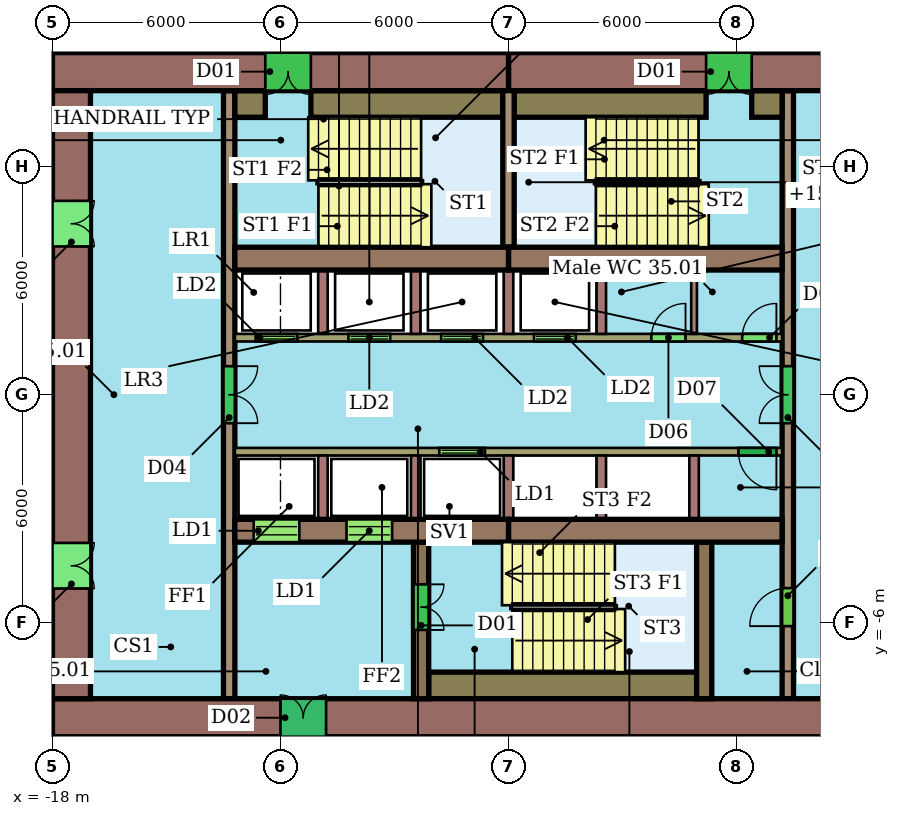
"""IFC4 building model, lengths in metres.
Left out: names, types, materials, properties, quantities, classifications, styles, units other than length and angle.
Written with IfcOpenShell. Run it as: python <this file> out.ifc"""

import sys

from ifc_helpers import new_model, si_unit, direction, frame, frame_2d, origin, place, context, subcontext, project, spatial, rectangle, extrude, element, fill, save


model = new_model("IFC4")
c1 = context("Model", 3, precision=1e-05, world=origin(), true_north=direction((0.0, 1.0)))
c2 = subcontext(c1, "Body", "Model", "MODEL_VIEW")
j1 = project(units=[si_unit("LENGTHUNIT", "METRE"), si_unit("PLANEANGLEUNIT", "RADIAN")], contexts=[c1])
p1 = place(None, origin())
s1 = spatial("IfcSite", under=j1, at=p1, CompositionType="ELEMENT")
p2 = place(p1, origin())
s2 = spatial("IfcBuilding", under=s1, at=p2, CompositionType="ELEMENT")
p3 = place(p2, frame((0.0, 0.0, 150.6)))
s3 = spatial("IfcBuildingStorey", under=s2, at=p3, CompositionType="ELEMENT", Elevation=150.6)
p4 = place(p3, frame((6.0, 8.5, 0.0), z_axis=(0.0, 0.0, 1.0), x_axis=(-1.0, 0.0, 0.0)))
e1 = element("IfcWall", 1, at=p4, inside=s3, PredefinedType="SHEAR", context=c2, shape_type="SweptSolid", body=[
    extrude(rectangle(XDim=12.0, YDim=1.0, at=frame_2d((6.0, 0.0))), origin(), (0.0, 0.0, 1.0), 3.3),
])
p5 = place(p4, frame((5.6, 0.0, 0.0)))
e2 = element("IfcOpeningElement", 2, at=p5, cuts=e1, PredefinedType="OPENING", context=c2, shape_type="SweptSolid", body=[
    extrude(rectangle(XDim=1.2, YDim=2.1, at=frame_2d((0.6, 1.05))), frame((0.0, 0.51, 0.0), z_axis=(0.0, -1.0, 0.0), x_axis=(1.0, 0.0, 0.0)), (0.0, 0.0, 1.0), 1.02),
])
p6 = place(p3, frame((-6.0, 8.5, 0.0), z_axis=(0.0, 0.0, 1.0), x_axis=(-1.0, 0.0, 0.0)))
e3 = element("IfcWall", 3, at=p6, inside=s3, PredefinedType="SHEAR", context=c2, shape_type="SweptSolid", body=[
    extrude(rectangle(XDim=12.0, YDim=1.0, at=frame_2d((6.0, 0.0))), origin(), (0.0, 0.0, 1.0), 3.3),
])
p7 = place(p6, frame((5.2, 0.0, 0.0)))
e4 = element("IfcOpeningElement", 4, at=p7, cuts=e3, PredefinedType="OPENING", context=c2, shape_type="SweptSolid", body=[
    extrude(rectangle(XDim=1.2, YDim=2.1, at=frame_2d((0.6, 1.05))), frame((0.0, 0.51, 0.0), z_axis=(0.0, -1.0, 0.0), x_axis=(1.0, 0.0, 0.0)), (0.0, 0.0, 1.0), 1.02),
])
p8 = place(p3, frame((-18.0, -8.5, 0.0), z_axis=(0.0, 0.0, 1.0), x_axis=(1.0, 0.0, 0.0)))
e5 = element("IfcWall", 5, at=p8, inside=s3, PredefinedType="SHEAR", context=c2, shape_type="SweptSolid", body=[
    extrude(rectangle(XDim=24.0, YDim=1.0, at=frame_2d((12.0, 0.0))), origin(), (0.0, 0.0, 1.0), 3.3),
])
p9 = place(p8, frame((6.0, 0.0, 0.0)))
e6 = element("IfcOpeningElement", 6, at=p9, cuts=e5, PredefinedType="OPENING", context=c2, shape_type="SweptSolid", body=[
    extrude(rectangle(XDim=1.2, YDim=2.1, at=frame_2d((0.6, 1.05))), frame((0.0, 0.51, 0.0), z_axis=(0.0, -1.0, 0.0), x_axis=(1.0, 0.0, 0.0)), (0.0, 0.0, 1.0), 1.02),
])
p10 = place(p3, frame((-17.5, 8.0, 0.0), z_axis=(0.0, 0.0, 1.0), x_axis=(0.0, -1.0, 0.0)))
e7 = element("IfcWall", 7, at=p10, inside=s3, PredefinedType="SHEAR", context=c2, shape_type="SweptSolid", body=[
    extrude(rectangle(XDim=16.0, YDim=1.0, at=frame_2d((8.0, 0.0))), origin(), (0.0, 0.0, 1.0), 3.3),
])
p11 = place(p10, frame((11.9, 0.0, 0.0)))
e8 = element("IfcOpeningElement", 8, at=p11, cuts=e7, PredefinedType="OPENING", context=c2, shape_type="SweptSolid", body=[
    extrude(rectangle(XDim=1.2, YDim=2.1, at=frame_2d((0.6, 1.05))), frame((0.0, 0.51, 0.0), z_axis=(0.0, -1.0, 0.0), x_axis=(1.0, 0.0, 0.0)), (0.0, 0.0, 1.0), 1.02),
])
p12 = place(p10, frame((2.9, 0.0, 0.0)))
e9 = element("IfcOpeningElement", 9, at=p12, cuts=e7, PredefinedType="OPENING", context=c2, shape_type="SweptSolid", body=[
    extrude(rectangle(XDim=1.2, YDim=2.1, at=frame_2d((0.6, 1.05))), frame((0.0, 0.51, 0.0), z_axis=(0.0, -1.0, 0.0), x_axis=(1.0, 0.0, 0.0)), (0.0, 0.0, 1.0), 1.02),
])
for number, where, z_axis, x_axis in (
    (10, (-13.2, 3.58, 0.0), (0.0, 0.0, 1.0), (1.0, 0.0, 0.0)),
    (11, (-6.0, 3.58, 0.0), (0.0, 0.0, 1.0), (1.0, 0.0, 0.0)),
):
    element("IfcWall", number, at=place(p3, frame(where, z_axis=z_axis, x_axis=x_axis)), inside=s3, PredefinedType="SHEAR", context=c2, shape_type="SweptSolid", body=[
        extrude(rectangle(XDim=7.2, YDim=0.6, at=frame_2d((3.6, 0.0))), origin(), (0.0, 0.0, 1.0), 3.3),
    ])
p13 = place(p3, frame((-13.2, -3.58, 0.0), z_axis=(0.0, 0.0, 1.0), x_axis=(1.0, 0.0, 0.0)))
e12 = element("IfcWall", 12, at=p13, inside=s3, PredefinedType="SHEAR", context=c2, shape_type="SweptSolid", body=[
    extrude(rectangle(XDim=7.2, YDim=0.6, at=frame_2d((3.6, 0.0))), origin(), (0.0, 0.0, 1.0), 3.3),
])
p14 = place(p13, frame((0.496, 0.0, 0.0)))
e13 = element("IfcOpeningElement", 13, at=p14, cuts=e12, PredefinedType="OPENING", context=c2, shape_type="SweptSolid", body=[
    extrude(rectangle(XDim=1.2, YDim=2.1, at=frame_2d((0.6, 1.05))), frame((0.0, 0.31, 0.0), z_axis=(0.0, -1.0, 0.0), x_axis=(1.0, 0.0, 0.0)), (0.0, 0.0, 1.0), 0.62),
])
p15 = place(p13, frame((2.938, 0.0, 0.0)))
e14 = element("IfcOpeningElement", 14, at=p15, cuts=e12, PredefinedType="OPENING", context=c2, shape_type="SweptSolid", body=[
    extrude(rectangle(XDim=1.2, YDim=2.1, at=frame_2d((0.6, 1.05))), frame((0.0, 0.31, 0.0), z_axis=(0.0, -1.0, 0.0), x_axis=(1.0, 0.0, 0.0)), (0.0, 0.0, 1.0), 0.62),
])
p16 = place(p3, frame((-6.0, -3.58, 0.0), z_axis=(0.0, 0.0, 1.0), x_axis=(1.0, 0.0, 0.0)))
e15 = element("IfcWall", 15, at=p16, inside=s3, PredefinedType="SHEAR", context=c2, shape_type="SweptSolid", body=[
    extrude(rectangle(XDim=7.2, YDim=0.6, at=frame_2d((3.6, 0.0))), origin(), (0.0, 0.0, 1.0), 3.3),
])
p17 = place(p3, frame((-13.35, 8.0, 0.0), z_axis=(0.0, 0.0, 1.0), x_axis=(0.0, -1.0, 0.0)))
e16 = element("IfcWall", 16, at=p17, inside=s3, PredefinedType="SHEAR", context=c2, shape_type="SweptSolid", body=[
    extrude(rectangle(XDim=16.0, YDim=0.3, at=frame_2d((8.0, 0.0))), origin(), (0.0, 0.0, 1.0), 3.3),
])
p18 = place(p17, frame((7.25, 0.0, 0.0)))
e17 = element("IfcOpeningElement", 17, at=p18, cuts=e16, PredefinedType="OPENING", context=c2, shape_type="SweptSolid", body=[
    extrude(rectangle(XDim=1.5, YDim=2.1, at=frame_2d((0.75, 1.05))), frame((0.0, 0.16, 0.0), z_axis=(0.0, -1.0, 0.0), x_axis=(1.0, 0.0, 0.0)), (0.0, 0.0, 1.0), 0.32),
])
p19 = place(p3, frame((1.35, -8.0, 0.0), z_axis=(0.0, 0.0, 1.0), x_axis=(0.0, 1.0, 0.0)))
e18 = element("IfcWall", 18, at=p19, inside=s3, PredefinedType="SHEAR", context=c2, shape_type="SweptSolid", body=[
    extrude(rectangle(XDim=16.0, YDim=0.3, at=frame_2d((8.0, 0.0))), origin(), (0.0, 0.0, 1.0), 3.3),
])
p20 = place(p19, frame((1.91, 0.0, 0.0)))
e19 = element("IfcOpeningElement", 19, at=p20, cuts=e18, PredefinedType="OPENING", context=c2, shape_type="SweptSolid", body=[
    extrude(rectangle(XDim=1.0, YDim=2.1, at=frame_2d((0.5, 1.05))), frame((0.0, 0.16, 0.0), z_axis=(0.0, -1.0, 0.0), x_axis=(1.0, 0.0, 0.0)), (0.0, 0.0, 1.0), 0.32),
])
p21 = place(p19, frame((7.25, 0.0, 0.0)))
e20 = element("IfcOpeningElement", 20, at=p21, cuts=e18, PredefinedType="OPENING", context=c2, shape_type="SweptSolid", body=[
    extrude(rectangle(XDim=1.5, YDim=2.1, at=frame_2d((0.75, 1.05))), frame((0.0, 0.16, 0.0), z_axis=(0.0, -1.0, 0.0), x_axis=(1.0, 0.0, 0.0)), (0.0, 0.0, 1.0), 0.32),
])
p22 = place(p3, frame((-13.2, 1.5, 0.0), z_axis=(0.0, 0.0, 1.0), x_axis=(1.0, 0.0, 0.0)))
e21 = element("IfcWall", 21, at=p22, inside=s3, PredefinedType="SHEAR", context=c2, shape_type="SweptSolid", body=[
    extrude(rectangle(XDim=14.4, YDim=0.2, at=frame_2d((7.2, 0.0))), origin(), (0.0, 0.0, 1.0), 3.3),
])
p23 = place(p22, frame((0.546, 0.0, 0.0)))
e22 = element("IfcOpeningElement", 22, at=p23, cuts=e21, PredefinedType="OPENING", context=c2, shape_type="SweptSolid", body=[
    extrude(rectangle(XDim=1.1, YDim=2.1, at=frame_2d((0.55, 1.05))), frame((0.0, 0.11, 0.0), z_axis=(0.0, -1.0, 0.0), x_axis=(1.0, 0.0, 0.0)), (0.0, 0.0, 1.0), 0.22),
])
p24 = place(p22, frame((2.988, 0.0, 0.0)))
e23 = element("IfcOpeningElement", 23, at=p24, cuts=e21, PredefinedType="OPENING", context=c2, shape_type="SweptSolid", body=[
    extrude(rectangle(XDim=1.1, YDim=2.1, at=frame_2d((0.55, 1.05))), frame((0.0, 0.11, 0.0), z_axis=(0.0, -1.0, 0.0), x_axis=(1.0, 0.0, 0.0)), (0.0, 0.0, 1.0), 0.22),
])
p25 = place(p22, frame((5.429, 0.0, 0.0)))
e24 = element("IfcOpeningElement", 24, at=p25, cuts=e21, PredefinedType="OPENING", context=c2, shape_type="SweptSolid", body=[
    extrude(rectangle(XDim=1.1, YDim=2.1, at=frame_2d((0.55, 1.05))), frame((0.0, 0.11, 0.0), z_axis=(0.0, -1.0, 0.0), x_axis=(1.0, 0.0, 0.0)), (0.0, 0.0, 1.0), 0.22),
])
p26 = place(p22, frame((7.871, 0.0, 0.0)))
e25 = element("IfcOpeningElement", 25, at=p26, cuts=e21, PredefinedType="OPENING", context=c2, shape_type="SweptSolid", body=[
    extrude(rectangle(XDim=1.1, YDim=2.1, at=frame_2d((0.55, 1.05))), frame((0.0, 0.11, 0.0), z_axis=(0.0, -1.0, 0.0), x_axis=(1.0, 0.0, 0.0)), (0.0, 0.0, 1.0), 0.22),
])
p27 = place(p22, frame((10.958, 0.0, 0.0)))
e26 = element("IfcOpeningElement", 26, at=p27, cuts=e21, PredefinedType="OPENING", context=c2, shape_type="SweptSolid", body=[
    extrude(rectangle(XDim=0.9, YDim=2.1, at=frame_2d((0.45, 1.05))), frame((0.0, 0.11, 0.0), z_axis=(0.0, -1.0, 0.0), x_axis=(1.0, 0.0, 0.0)), (0.0, 0.0, 1.0), 0.22),
])
p28 = place(p22, frame((13.35, 0.0, 0.0)))
e27 = element("IfcOpeningElement", 27, at=p28, cuts=e21, PredefinedType="OPENING", context=c2, shape_type="SweptSolid", body=[
    extrude(rectangle(XDim=0.9, YDim=2.1, at=frame_2d((0.45, 1.05))), frame((0.0, 0.11, 0.0), z_axis=(0.0, -1.0, 0.0), x_axis=(1.0, 0.0, 0.0)), (0.0, 0.0, 1.0), 0.22),
])
p29 = place(p3, frame((1.2, -1.5, 0.0), z_axis=(0.0, 0.0, 1.0), x_axis=(-1.0, 0.0, 0.0)))
e28 = element("IfcWall", 28, at=p29, inside=s3, PredefinedType="SHEAR", context=c2, shape_type="SweptSolid", body=[
    extrude(rectangle(XDim=14.4, YDim=0.2, at=frame_2d((7.2, 0.0))), origin(), (0.0, 0.0, 1.0), 3.3),
])
p30 = place(p29, frame((7.821, 0.0, 0.0)))
e29 = element("IfcOpeningElement", 29, at=p30, cuts=e28, PredefinedType="OPENING", context=c2, shape_type="SweptSolid", body=[
    extrude(rectangle(XDim=1.2, YDim=2.1, at=frame_2d((0.6, 1.05))), frame((0.0, 0.11, 0.0), z_axis=(0.0, -1.0, 0.0), x_axis=(1.0, 0.0, 0.0)), (0.0, 0.0, 1.0), 0.22),
])
p31 = place(p29, frame((0.15, 0.0, 0.0)))
e30 = element("IfcOpeningElement", 30, at=p31, cuts=e28, PredefinedType="OPENING", context=c2, shape_type="SweptSolid", body=[
    extrude(rectangle(XDim=1.0, YDim=2.1, at=frame_2d((0.5, 1.05))), frame((0.0, 0.11, 0.0), z_axis=(0.0, -1.0, 0.0), x_axis=(1.0, 0.0, 0.0)), (0.0, 0.0, 1.0), 0.22),
])
p32 = place(p3, frame((-8.3, -3.88, 0.0), z_axis=(0.0, 0.0, 1.0), x_axis=(0.0, -1.0, 0.0)))
e31 = element("IfcWall", 31, at=p32, inside=s3, PredefinedType="SHEAR", context=c2, shape_type="SweptSolid", body=[
    extrude(rectangle(XDim=4.12, YDim=0.4, at=frame_2d((2.06, 0.0))), origin(), (0.0, 0.0, 1.0), 3.3),
])
p33 = place(p32, frame((1.11, 0.0, 0.0)))
e32 = element("IfcOpeningElement", 32, at=p33, cuts=e31, PredefinedType="OPENING", context=c2, shape_type="SweptSolid", body=[
    extrude(rectangle(XDim=1.2, YDim=2.1, at=frame_2d((0.6, 1.05))), frame((0.0, 0.21, 0.0), z_axis=(0.0, -1.0, 0.0), x_axis=(1.0, 0.0, 0.0)), (0.0, 0.0, 1.0), 0.42),
])
p34 = place(p3, frame((-0.85, -3.88, 0.0), z_axis=(0.0, 0.0, 1.0), x_axis=(0.0, -1.0, 0.0)))
e33 = element("IfcWall", 33, at=p34, inside=s3, PredefinedType="SHEAR", context=c2, shape_type="SweptSolid", body=[
    extrude(rectangle(XDim=4.12, YDim=0.4, at=frame_2d((2.06, 0.0))), origin(), (0.0, 0.0, 1.0), 3.3),
])
p35 = place(p3, frame((-6.0, 3.88, 0.0), z_axis=(0.0, 0.0, 1.0), x_axis=(0.0, 1.0, 0.0)))
e34 = element("IfcWall", 34, at=p35, inside=s3, PredefinedType="SHEAR", context=c2, shape_type="SweptSolid", body=[
    extrude(rectangle(XDim=4.12, YDim=0.3, at=frame_2d((2.06, 0.0))), origin(), (0.0, 0.0, 1.0), 3.3),
])
p36 = place(p3, frame((-13.2, 7.65, 0.0), z_axis=(0.0, 0.0, 1.0), x_axis=(1.0, 0.0, 0.0)))
e35 = element("IfcWall", 35, at=p36, inside=s3, PredefinedType="SHEAR", context=c2, shape_type="SweptSolid", body=[
    extrude(rectangle(XDim=0.8, YDim=0.7, at=frame_2d((0.4, 0.0))), origin(), (0.0, 0.0, 1.0), 3.3),
])
for number, where, z_axis, x_axis in (
    (36, (-11.2, 7.65, 0.0), (0.0, 0.0, 1.0), (1.0, 0.0, 0.0)),
    (37, (-5.85, 7.65, 0.0), (0.0, 0.0, 1.0), (1.0, 0.0, 0.0)),
):
    element("IfcWall", number, at=place(p3, frame(where, z_axis=z_axis, x_axis=x_axis)), inside=s3, PredefinedType="SHEAR", context=c2, shape_type="SweptSolid", body=[
        extrude(rectangle(XDim=5.05, YDim=0.7, at=frame_2d((2.525, 0.0))), origin(), (0.0, 0.0, 1.0), 3.3),
    ])
p37 = place(p3, frame((0.4, 7.65, 0.0), z_axis=(0.0, 0.0, 1.0), x_axis=(1.0, 0.0, 0.0)))
e38 = element("IfcWall", 38, at=p37, inside=s3, PredefinedType="SHEAR", context=c2, shape_type="SweptSolid", body=[
    extrude(rectangle(XDim=0.8, YDim=0.7, at=frame_2d((0.4, 0.0))), origin(), (0.0, 0.0, 1.0), 3.3),
])
p38 = place(p3, frame((-8.1, -7.65, 0.0), z_axis=(0.0, 0.0, 1.0), x_axis=(1.0, 0.0, 0.0)))
e39 = element("IfcWall", 39, at=p38, inside=s3, PredefinedType="SHEAR", context=c2, shape_type="SweptSolid", body=[
    extrude(rectangle(XDim=7.05, YDim=0.7, at=frame_2d((3.525, 0.0))), origin(), (0.0, 0.0, 1.0), 3.3),
])
for number, where, z_axis, x_axis in (
    (40, (-10.883, 1.6, 0.0), (0.0, 0.0, 1.0), (0.0, 1.0, 0.0)),
    (41, (-8.442, 1.6, 0.0), (0.0, 0.0, 1.0), (0.0, 1.0, 0.0)),
    (42, (-6.0, 1.6, 0.0), (0.0, 0.0, 1.0), (0.0, 1.0, 0.0)),
    (43, (-3.558, 1.6, 0.0), (0.0, 0.0, 1.0), (0.0, 1.0, 0.0)),
):
    element("IfcWall", number, at=place(p3, frame(where, z_axis=z_axis, x_axis=x_axis)), inside=s3, PredefinedType="SHEAR", context=c2, shape_type="SweptSolid", body=[
        extrude(rectangle(XDim=1.68, YDim=0.25, at=frame_2d((0.84, 0.0))), origin(), (0.0, 0.0, 1.0), 3.3),
    ])
p39 = place(p3, frame((-1.117, 1.6, 0.0), z_axis=(0.0, 0.0, 1.0), x_axis=(0.0, 1.0, 0.0)))
e44 = element("IfcWall", 44, at=p39, inside=s3, PredefinedType="PARTITIONING", context=c2, shape_type="SweptSolid", body=[
    extrude(rectangle(XDim=1.68, YDim=0.15, at=frame_2d((0.84, 0.0))), origin(), (0.0, 0.0, 1.0), 3.3),
])
for number, where, z_axis, x_axis in (
    (45, (-10.883, -1.6, 0.0), (0.0, 0.0, 1.0), (0.0, -1.0, 0.0)),
    (46, (-8.442, -1.6, 0.0), (0.0, 0.0, 1.0), (0.0, -1.0, 0.0)),
    (47, (-6.0, -1.6, 0.0), (0.0, 0.0, 1.0), (0.0, -1.0, 0.0)),
    (48, (-3.558, -1.6, 0.0), (0.0, 0.0, 1.0), (0.0, -1.0, 0.0)),
    (49, (-1.117, -1.6, 0.0), (0.0, 0.0, 1.0), (0.0, -1.0, 0.0)),
):
    element("IfcWall", number, at=place(p3, frame(where, z_axis=z_axis, x_axis=x_axis)), inside=s3, PredefinedType="SHEAR", context=c2, shape_type="SweptSolid", body=[
        extrude(rectangle(XDim=1.68, YDim=0.25, at=frame_2d((0.84, 0.0))), origin(), (0.0, 0.0, 1.0), 3.3),
    ])
p40 = place(p5, origin())
e50 = element("IfcDoor", 50, at=p40, inside=s3, OperationType="DOUBLE_DOOR_SINGLE_SWING", PredefinedType="NOTDEFINED", context=c2, shape_type="SweptSolid", body=[
    extrude(rectangle(XDim=1.2, YDim=2.1, at=frame_2d((0.6, 1.05))), frame((0.0, 0.025, 0.0), z_axis=(0.0, -1.0, 0.0), x_axis=(1.0, 0.0, 0.0)), (0.0, 0.0, 1.0), 0.05),
])
fill(e2, e50)
p41 = place(p7, origin())
e51 = element("IfcDoor", 51, at=p41, inside=s3, OperationType="DOUBLE_DOOR_SINGLE_SWING", PredefinedType="NOTDEFINED", context=c2, shape_type="SweptSolid", body=[
    extrude(rectangle(XDim=1.2, YDim=2.1, at=frame_2d((0.6, 1.05))), frame((0.0, 0.025, 0.0), z_axis=(0.0, -1.0, 0.0), x_axis=(1.0, 0.0, 0.0)), (0.0, 0.0, 1.0), 0.05),
])
fill(e4, e51)
p42 = place(p9, origin())
e52 = element("IfcDoor", 52, at=p42, inside=s3, OperationType="DOUBLE_DOOR_SINGLE_SWING", PredefinedType="NOTDEFINED", context=c2, shape_type="SweptSolid", body=[
    extrude(rectangle(XDim=1.2, YDim=2.1, at=frame_2d((0.6, 1.05))), frame((0.0, 0.025, 0.0), z_axis=(0.0, -1.0, 0.0), x_axis=(1.0, 0.0, 0.0)), (0.0, 0.0, 1.0), 0.05),
])
fill(e6, e52)
p43 = place(p11, origin())
e53 = element("IfcDoor", 53, at=p43, inside=s3, OperationType="DOUBLE_DOOR_SINGLE_SWING", PredefinedType="NOTDEFINED", context=c2, shape_type="SweptSolid", body=[
    extrude(rectangle(XDim=1.2, YDim=2.1, at=frame_2d((0.6, 1.05))), frame((0.0, 0.025, 0.0), z_axis=(0.0, -1.0, 0.0), x_axis=(1.0, 0.0, 0.0)), (0.0, 0.0, 1.0), 0.05),
])
fill(e8, e53)
p44 = place(p12, origin())
e54 = element("IfcDoor", 54, at=p44, inside=s3, OperationType="DOUBLE_DOOR_SINGLE_SWING", PredefinedType="NOTDEFINED", context=c2, shape_type="SweptSolid", body=[
    extrude(rectangle(XDim=1.2, YDim=2.1, at=frame_2d((0.6, 1.05))), frame((0.0, 0.025, 0.0), z_axis=(0.0, -1.0, 0.0), x_axis=(1.0, 0.0, 0.0)), (0.0, 0.0, 1.0), 0.05),
])
fill(e9, e54)
p45 = place(p14, origin())
e55 = element("IfcDoor", 55, at=p45, inside=s3, OperationType="DOUBLE_DOOR_SLIDING", PredefinedType="NOTDEFINED", context=c2, shape_type="SweptSolid", body=[
    extrude(rectangle(XDim=1.2, YDim=2.1, at=frame_2d((0.6, 1.05))), frame((0.0, 0.025, 0.0), z_axis=(0.0, -1.0, 0.0), x_axis=(1.0, 0.0, 0.0)), (0.0, 0.0, 1.0), 0.05),
])
fill(e13, e55)
p46 = place(p15, origin())
e56 = element("IfcDoor", 56, at=p46, inside=s3, OperationType="DOUBLE_DOOR_SLIDING", PredefinedType="NOTDEFINED", context=c2, shape_type="SweptSolid", body=[
    extrude(rectangle(XDim=1.2, YDim=2.1, at=frame_2d((0.6, 1.05))), frame((0.0, 0.025, 0.0), z_axis=(0.0, -1.0, 0.0), x_axis=(1.0, 0.0, 0.0)), (0.0, 0.0, 1.0), 0.05),
])
fill(e14, e56)
p47 = place(p18, origin())
e57 = element("IfcDoor", 57, at=p47, inside=s3, OperationType="DOUBLE_DOOR_SINGLE_SWING", PredefinedType="NOTDEFINED", context=c2, shape_type="SweptSolid", body=[
    extrude(rectangle(XDim=1.5, YDim=2.1, at=frame_2d((0.75, 1.05))), frame((0.0, 0.025, 0.0), z_axis=(0.0, -1.0, 0.0), x_axis=(1.0, 0.0, 0.0)), (0.0, 0.0, 1.0), 0.05),
])
fill(e17, e57)
p48 = place(p20, origin())
e58 = element("IfcDoor", 58, at=p48, inside=s3, OperationType="SINGLE_SWING_LEFT", PredefinedType="NOTDEFINED", context=c2, shape_type="SweptSolid", body=[
    extrude(rectangle(XDim=1.0, YDim=2.1, at=frame_2d((0.5, 1.05))), frame((0.0, 0.025, 0.0), z_axis=(0.0, -1.0, 0.0), x_axis=(1.0, 0.0, 0.0)), (0.0, 0.0, 1.0), 0.05),
])
fill(e19, e58)
p49 = place(p21, origin())
e59 = element("IfcDoor", 59, at=p49, inside=s3, OperationType="DOUBLE_DOOR_SINGLE_SWING", PredefinedType="NOTDEFINED", context=c2, shape_type="SweptSolid", body=[
    extrude(rectangle(XDim=1.5, YDim=2.1, at=frame_2d((0.75, 1.05))), frame((0.0, 0.025, 0.0), z_axis=(0.0, -1.0, 0.0), x_axis=(1.0, 0.0, 0.0)), (0.0, 0.0, 1.0), 0.05),
])
fill(e20, e59)
p50 = place(p23, origin())
e60 = element("IfcDoor", 60, at=p50, inside=s3, OperationType="DOUBLE_DOOR_SLIDING", PredefinedType="NOTDEFINED", context=c2, shape_type="SweptSolid", body=[
    extrude(rectangle(XDim=1.1, YDim=2.1, at=frame_2d((0.55, 1.05))), frame((0.0, 0.025, 0.0), z_axis=(0.0, -1.0, 0.0), x_axis=(1.0, 0.0, 0.0)), (0.0, 0.0, 1.0), 0.05),
])
fill(e22, e60)
p51 = place(p24, origin())
e61 = element("IfcDoor", 61, at=p51, inside=s3, OperationType="DOUBLE_DOOR_SLIDING", PredefinedType="NOTDEFINED", context=c2, shape_type="SweptSolid", body=[
    extrude(rectangle(XDim=1.1, YDim=2.1, at=frame_2d((0.55, 1.05))), frame((0.0, 0.025, 0.0), z_axis=(0.0, -1.0, 0.0), x_axis=(1.0, 0.0, 0.0)), (0.0, 0.0, 1.0), 0.05),
])
fill(e23, e61)
p52 = place(p25, origin())
e62 = element("IfcDoor", 62, at=p52, inside=s3, OperationType="DOUBLE_DOOR_SLIDING", PredefinedType="NOTDEFINED", context=c2, shape_type="SweptSolid", body=[
    extrude(rectangle(XDim=1.1, YDim=2.1, at=frame_2d((0.55, 1.05))), frame((0.0, 0.025, 0.0), z_axis=(0.0, -1.0, 0.0), x_axis=(1.0, 0.0, 0.0)), (0.0, 0.0, 1.0), 0.05),
])
fill(e24, e62)
p53 = place(p26, origin())
e63 = element("IfcDoor", 63, at=p53, inside=s3, OperationType="DOUBLE_DOOR_SLIDING", PredefinedType="NOTDEFINED", context=c2, shape_type="SweptSolid", body=[
    extrude(rectangle(XDim=1.1, YDim=2.1, at=frame_2d((0.55, 1.05))), frame((0.0, 0.025, 0.0), z_axis=(0.0, -1.0, 0.0), x_axis=(1.0, 0.0, 0.0)), (0.0, 0.0, 1.0), 0.05),
])
fill(e25, e63)
p54 = place(p27, origin())
e64 = element("IfcDoor", 64, at=p54, inside=s3, OperationType="SINGLE_SWING_RIGHT", PredefinedType="NOTDEFINED", context=c2, shape_type="SweptSolid", body=[
    extrude(rectangle(XDim=0.9, YDim=2.1, at=frame_2d((0.45, 1.05))), frame((0.0, 0.025, 0.0), z_axis=(0.0, -1.0, 0.0), x_axis=(1.0, 0.0, 0.0)), (0.0, 0.0, 1.0), 0.05),
])
fill(e26, e64)
p55 = place(p28, origin())
e65 = element("IfcDoor", 65, at=p55, inside=s3, OperationType="SINGLE_SWING_RIGHT", PredefinedType="NOTDEFINED", context=c2, shape_type="SweptSolid", body=[
    extrude(rectangle(XDim=0.9, YDim=2.1, at=frame_2d((0.45, 1.05))), frame((0.0, 0.025, 0.0), z_axis=(0.0, -1.0, 0.0), x_axis=(1.0, 0.0, 0.0)), (0.0, 0.0, 1.0), 0.05),
])
fill(e27, e65)
p56 = place(p30, origin())
e66 = element("IfcDoor", 66, at=p56, inside=s3, OperationType="DOUBLE_DOOR_SLIDING", PredefinedType="NOTDEFINED", context=c2, shape_type="SweptSolid", body=[
    extrude(rectangle(XDim=1.2, YDim=2.1, at=frame_2d((0.6, 1.05))), frame((0.0, 0.025, 0.0), z_axis=(0.0, -1.0, 0.0), x_axis=(1.0, 0.0, 0.0)), (0.0, 0.0, 1.0), 0.05),
])
fill(e29, e66)
p57 = place(p31, origin())
e67 = element("IfcDoor", 67, at=p57, inside=s3, OperationType="SINGLE_SWING_LEFT", PredefinedType="NOTDEFINED", context=c2, shape_type="SweptSolid", body=[
    extrude(rectangle(XDim=1.0, YDim=2.1, at=frame_2d((0.5, 1.05))), frame((0.0, 0.025, 0.0), z_axis=(0.0, -1.0, 0.0), x_axis=(1.0, 0.0, 0.0)), (0.0, 0.0, 1.0), 0.05),
])
fill(e30, e67)
p58 = place(p33, origin())
e68 = element("IfcDoor", 68, at=p58, inside=s3, OperationType="DOUBLE_DOOR_SINGLE_SWING", PredefinedType="NOTDEFINED", context=c2, shape_type="SweptSolid", body=[
    extrude(rectangle(XDim=1.2, YDim=2.1, at=frame_2d((0.6, 1.05))), frame((0.0, 0.025, 0.0), z_axis=(0.0, -1.0, 0.0), x_axis=(1.0, 0.0, 0.0)), (0.0, 0.0, 1.0), 0.05),
])
fill(e32, e68)
save(model, sys.argv[1])
